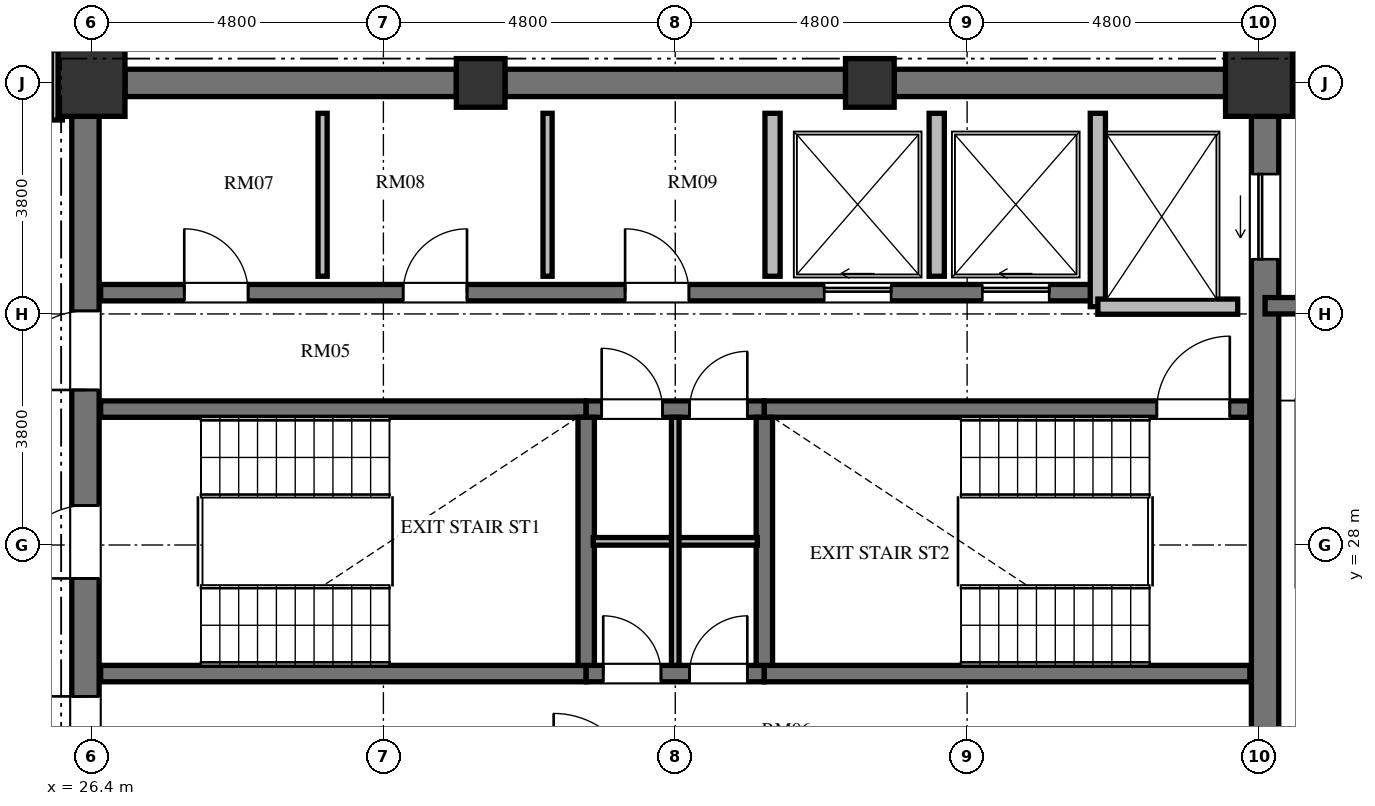
"""IFC4 building model, lengths in metres.
Left out: names, types, materials, properties, quantities, classifications, styles, units other than length and angle.
Written with IfcOpenShell. Run it as: python <this file> out.ifc"""

import sys

from ifc_helpers import new_model, si_unit, direction, frame, frame_2d, origin, origin_2d, place, context, subcontext, project, spatial, rectangle, extrude, element, fill, save


model = new_model("IFC4")
c1 = context("Model", 3, precision=1e-05, world=origin(), true_north=direction((0.0, 1.0)))
c2 = subcontext(c1, "Body", "Model", "MODEL_VIEW")
j1 = project(units=[si_unit("LENGTHUNIT", "METRE"), si_unit("PLANEANGLEUNIT", "RADIAN")], contexts=[c1])
p1 = place(None, origin())
s1 = spatial("IfcSite", under=j1, at=p1, CompositionType="ELEMENT")
p2 = place(p1, origin())
s2 = spatial("IfcBuilding", under=s1, at=p2, CompositionType="ELEMENT")
p3 = place(p2, frame((0.0, 0.0, 234.96)))
s3 = spatial("IfcBuildingStorey", under=s2, at=p3, CompositionType="ELEMENT", Elevation=234.96)
p4 = place(p3, frame((45.6, 35.6, 0.0), z_axis=(0.0, 0.0, 1.0), x_axis=(1.0, 0.0, 0.0)))
e1 = element("IfcColumn", 1, at=p4, inside=s3, PredefinedType="COLUMN", context=c2, shape_type="SweptSolid", body=[
    extrude(rectangle(XDim=1.1, YDim=1.1, at=origin_2d()), origin(), (0.0, 0.0, 1.0), 3.648),
])
for number, where, z_axis, x_axis in (
    (2, (39.2, 35.6, 0.0), (0.0, 0.0, 1.0), (1.0, 0.0, 0.0)),
    (3, (32.8, 35.6, 0.0), (0.0, 0.0, 1.0), (1.0, 0.0, 0.0)),
):
    element("IfcColumn", number, at=place(p3, frame(where, z_axis=z_axis, x_axis=x_axis)), inside=s3, PredefinedType="COLUMN", context=c2, shape_type="SweptSolid", body=[
        extrude(rectangle(XDim=0.8, YDim=0.8, at=origin_2d()), origin(), (0.0, 0.0, 1.0), 3.648),
    ])
p5 = place(p3, frame((26.4, 35.6, 0.0), z_axis=(0.0, 0.0, 1.0), x_axis=(1.0, 0.0, 0.0)))
e4 = element("IfcColumn", 4, at=p5, inside=s3, PredefinedType="COLUMN", context=c2, shape_type="SweptSolid", body=[
    extrude(rectangle(XDim=1.1, YDim=1.1, at=origin_2d()), origin(), (0.0, 0.0, 1.0), 3.648),
])
p6 = place(p3, frame((26.3, 20.95, 0.0), z_axis=(0.0, 0.0, 1.0), x_axis=(0.0, 1.0, 0.0)))
e5 = element("IfcWall", 5, at=p6, inside=s3, PredefinedType="SHEAR", context=c2, shape_type="SweptSolid", body=[
    extrude(rectangle(XDim=14.1, YDim=0.45, at=frame_2d((7.05, 0.0))), origin(), (0.0, 0.0, 1.0), 3.648),
])
p7 = place(p6, frame((6.5, 0.0, 0.0)))
e6 = element("IfcOpeningElement", 6, at=p7, cuts=e5, PredefinedType="OPENING", context=c2, shape_type="SweptSolid", body=[
    extrude(rectangle(XDim=1.2, YDim=2.15, at=frame_2d((0.6, 1.075))), frame((0.0, 0.235, 0.0), z_axis=(0.0, -1.0, 0.0), x_axis=(1.0, 0.0, 0.0)), (0.0, 0.0, 1.0), 0.47),
])
p8 = place(p6, frame((9.6, 0.0, 0.0)))
e7 = element("IfcOpeningElement", 7, at=p8, cuts=e5, PredefinedType="OPENING", context=c2, shape_type="SweptSolid", body=[
    extrude(rectangle(XDim=1.3, YDim=2.2, at=frame_2d((0.65, 1.1))), frame((0.0, 0.235, 0.0), z_axis=(0.0, -1.0, 0.0), x_axis=(1.0, 0.0, 0.0)), (0.0, 0.0, 1.0), 0.47),
])
p9 = place(p6, frame((3.26, 0.0, 0.0)))
e8 = element("IfcOpeningElement", 8, at=p9, cuts=e5, PredefinedType="OPENING", context=c2, shape_type="SweptSolid", body=[
    extrude(rectangle(XDim=1.3, YDim=2.2, at=frame_2d((0.65, 1.1))), frame((0.0, 0.235, 0.0), z_axis=(0.0, -1.0, 0.0), x_axis=(1.0, 0.0, 0.0)), (0.0, 0.0, 1.0), 0.47),
])
p10 = place(p3, frame((45.7, 20.95, 0.0), z_axis=(0.0, 0.0, 1.0), x_axis=(0.0, 1.0, 0.0)))
e9 = element("IfcWall", 9, at=p10, inside=s3, PredefinedType="SHEAR", context=c2, shape_type="SweptSolid", body=[
    extrude(rectangle(XDim=14.1, YDim=0.45, at=frame_2d((7.05, 0.0))), origin(), (0.0, 0.0, 1.0), 3.648),
])
p11 = place(p10, frame((11.75, 0.0, 0.0)))
e10 = element("IfcOpeningElement", 10, at=p11, cuts=e9, PredefinedType="OPENING", context=c2, shape_type="SweptSolid", body=[
    extrude(rectangle(XDim=1.4, YDim=2.3, at=frame_2d((0.7, 1.15))), frame((0.0, 0.235, 0.0), z_axis=(0.0, -1.0, 0.0), x_axis=(1.0, 0.0, 0.0)), (0.0, 0.0, 1.0), 0.47),
])
p12 = place(p10, frame((0.95, 0.0, 0.0)))
e11 = element("IfcOpeningElement", 11, at=p12, cuts=e9, PredefinedType="OPENING", context=c2, shape_type="SweptSolid", body=[
    extrude(rectangle(XDim=1.4, YDim=2.3, at=frame_2d((0.7, 1.15))), frame((0.0, 0.235, 0.0), z_axis=(0.0, -1.0, 0.0), x_axis=(1.0, 0.0, 0.0)), (0.0, 0.0, 1.0), 0.47),
])
p13 = place(p3, frame((26.95, 35.6, 0.0), z_axis=(0.0, 0.0, 1.0), x_axis=(1.0, 0.0, 0.0)))
e12 = element("IfcWall", 12, at=p13, inside=s3, PredefinedType="SHEAR", context=c2, shape_type="SweptSolid", body=[
    extrude(rectangle(XDim=5.45, YDim=0.45, at=frame_2d((2.725, 0.0))), origin(), (0.0, 0.0, 1.0), 3.648),
])
p14 = place(p3, frame((33.2, 35.6, 0.0), z_axis=(0.0, 0.0, 1.0), x_axis=(1.0, 0.0, 0.0)))
e13 = element("IfcWall", 13, at=p14, inside=s3, PredefinedType="SHEAR", context=c2, shape_type="SweptSolid", body=[
    extrude(rectangle(XDim=5.6, YDim=0.45, at=frame_2d((2.8, 0.0))), origin(), (0.0, 0.0, 1.0), 3.648),
])
p15 = place(p3, frame((39.6, 35.6, 0.0), z_axis=(0.0, 0.0, 1.0), x_axis=(1.0, 0.0, 0.0)))
e14 = element("IfcWall", 14, at=p15, inside=s3, PredefinedType="SHEAR", context=c2, shape_type="SweptSolid", body=[
    extrude(rectangle(XDim=5.45, YDim=0.45, at=frame_2d((2.725, 0.0))), origin(), (0.0, 0.0, 1.0), 3.648),
])
p16 = place(p3, frame((26.55, 30.235, 0.0), z_axis=(0.0, 0.0, 1.0), x_axis=(1.0, 0.0, 0.0)))
e15 = element("IfcWall", 15, at=p16, inside=s3, PredefinedType="SHEAR", context=c2, shape_type="SweptSolid", body=[
    extrude(rectangle(XDim=7.985, YDim=0.27, at=frame_2d((3.992, 0.0))), origin(), (0.0, 0.0, 1.0), 3.648),
])
p17 = place(p3, frame((34.535, 30.235, 0.0), z_axis=(0.0, 0.0, 1.0), x_axis=(1.0, 0.0, 0.0)))
e16 = element("IfcWall", 16, at=p17, inside=s3, PredefinedType="SHEAR", context=c2, shape_type="SweptSolid", body=[
    extrude(rectangle(XDim=2.93, YDim=0.27, at=frame_2d((1.465, 0.0))), origin(), (0.0, 0.0, 1.0), 3.648),
])
p18 = place(p17, frame((0.255, 0.0, 0.0)))
e17 = element("IfcOpeningElement", 17, at=p18, cuts=e16, PredefinedType="OPENING", context=c2, shape_type="SweptSolid", body=[
    extrude(rectangle(XDim=1.0, YDim=2.1, at=frame_2d((0.5, 1.05))), frame((0.0, 0.145, 0.0), z_axis=(0.0, -1.0, 0.0), x_axis=(1.0, 0.0, 0.0)), (0.0, 0.0, 1.0), 0.29),
])
p19 = place(p17, frame((1.7, 0.0, 0.0)))
e18 = element("IfcOpeningElement", 18, at=p19, cuts=e16, PredefinedType="OPENING", context=c2, shape_type="SweptSolid", body=[
    extrude(rectangle(XDim=0.95, YDim=2.1, at=frame_2d((0.475, 1.05))), frame((0.0, 0.145, 0.0), z_axis=(0.0, -1.0, 0.0), x_axis=(1.0, 0.0, 0.0)), (0.0, 0.0, 1.0), 0.29),
])
p20 = place(p3, frame((37.465, 30.235, 0.0), z_axis=(0.0, 0.0, 1.0), x_axis=(1.0, 0.0, 0.0)))
e19 = element("IfcWall", 19, at=p20, inside=s3, PredefinedType="SHEAR", context=c2, shape_type="SweptSolid", body=[
    extrude(rectangle(XDim=7.985, YDim=0.27, at=frame_2d((3.992, 0.0))), origin(), (0.0, 0.0, 1.0), 3.648),
])
p21 = place(p20, frame((6.455, 0.0, 0.0)))
e20 = element("IfcOpeningElement", 20, at=p21, cuts=e19, PredefinedType="OPENING", context=c2, shape_type="SweptSolid", body=[
    extrude(rectangle(XDim=1.2, YDim=2.15, at=frame_2d((0.6, 1.075))), frame((0.0, 0.145, 0.0), z_axis=(0.0, -1.0, 0.0), x_axis=(1.0, 0.0, 0.0)), (0.0, 0.0, 1.0), 0.29),
])
p22 = place(p3, frame((26.55, 25.885, 0.0), z_axis=(0.0, 0.0, 1.0), x_axis=(1.0, 0.0, 0.0)))
e21 = element("IfcWall", 21, at=p22, inside=s3, PredefinedType="SHEAR", context=c2, shape_type="SweptSolid", body=[
    extrude(rectangle(XDim=7.985, YDim=0.27, at=frame_2d((3.992, 0.0))), origin(), (0.0, 0.0, 1.0), 3.648),
])
p23 = place(p3, frame((34.535, 25.885, 0.0), z_axis=(0.0, 0.0, 1.0), x_axis=(1.0, 0.0, 0.0)))
e22 = element("IfcWall", 22, at=p23, inside=s3, PredefinedType="SHEAR", context=c2, shape_type="SweptSolid", body=[
    extrude(rectangle(XDim=2.93, YDim=0.27, at=frame_2d((1.465, 0.0))), origin(), (0.0, 0.0, 1.0), 3.648),
])
p24 = place(p23, frame((0.28, 0.0, 0.0)))
e23 = element("IfcOpeningElement", 23, at=p24, cuts=e22, PredefinedType="OPENING", context=c2, shape_type="SweptSolid", body=[
    extrude(rectangle(XDim=0.95, YDim=2.1, at=frame_2d((0.475, 1.05))), frame((0.0, 0.145, 0.0), z_axis=(0.0, -1.0, 0.0), x_axis=(1.0, 0.0, 0.0)), (0.0, 0.0, 1.0), 0.29),
])
p25 = place(p23, frame((1.7, 0.0, 0.0)))
e24 = element("IfcOpeningElement", 24, at=p25, cuts=e22, PredefinedType="OPENING", context=c2, shape_type="SweptSolid", body=[
    extrude(rectangle(XDim=0.95, YDim=2.1, at=frame_2d((0.475, 1.05))), frame((0.0, 0.145, 0.0), z_axis=(0.0, -1.0, 0.0), x_axis=(1.0, 0.0, 0.0)), (0.0, 0.0, 1.0), 0.29),
])
p26 = place(p3, frame((37.465, 25.885, 0.0), z_axis=(0.0, 0.0, 1.0), x_axis=(1.0, 0.0, 0.0)))
e25 = element("IfcWall", 25, at=p26, inside=s3, PredefinedType="SHEAR", context=c2, shape_type="SweptSolid", body=[
    extrude(rectangle(XDim=7.985, YDim=0.27, at=frame_2d((3.992, 0.0))), origin(), (0.0, 0.0, 1.0), 3.648),
])
for number, where, z_axis, x_axis in (
    (26, (34.535, 26.02, 0.0), (0.0, 0.0, 1.0), (0.0, 1.0, 0.0)),
    (27, (37.465, 26.02, 0.0), (0.0, 0.0, 1.0), (0.0, 1.0, 0.0)),
):
    element("IfcWall", number, at=place(p3, frame(where, z_axis=z_axis, x_axis=x_axis)), inside=s3, PredefinedType="SHEAR", context=c2, shape_type="SweptSolid", body=[
        extrude(rectangle(XDim=4.08, YDim=0.27, at=frame_2d((2.04, 0.0))), origin(), (0.0, 0.0, 1.0), 3.648),
    ])
p27 = place(p3, frame((34.65, 28.06, 0.0), z_axis=(0.0, 0.0, 1.0), x_axis=(1.0, 0.0, 0.0)))
e28 = element("IfcWall", 28, at=p27, inside=s3, PredefinedType="PARTITIONING", context=c2, shape_type="SweptSolid", body=[
    extrude(rectangle(XDim=2.7, YDim=0.125, at=frame_2d((1.35, 0.0))), origin(), (0.0, 0.0, 1.0), 3.448),
])
p28 = place(p3, frame((36.0, 26.02, 0.0), z_axis=(0.0, 0.0, 1.0), x_axis=(0.0, 1.0, 0.0)))
e29 = element("IfcWall", 29, at=p28, inside=s3, PredefinedType="PARTITIONING", context=c2, shape_type="SweptSolid", body=[
    extrude(rectangle(XDim=4.08, YDim=0.125, at=frame_2d((2.04, 0.0))), origin(), (0.0, 0.0, 1.0), 3.448),
])
p29 = place(p3, frame((26.55, 32.15, 0.0), z_axis=(0.0, 0.0, 1.0), x_axis=(1.0, 0.0, 0.0)))
e30 = element("IfcWall", 30, at=p29, inside=s3, PredefinedType="SHEAR", context=c2, shape_type="SweptSolid", body=[
    extrude(rectangle(XDim=16.4, YDim=0.27, at=frame_2d((8.2, 0.0))), origin(), (0.0, 0.0, 1.0), 3.648),
])
p30 = place(p29, frame((1.375, 0.0, 0.0)))
e31 = element("IfcOpeningElement", 31, at=p30, cuts=e30, PredefinedType="OPENING", context=c2, shape_type="SweptSolid", body=[
    extrude(rectangle(XDim=1.05, YDim=2.15, at=frame_2d((0.525, 1.075))), frame((0.0, 0.145, 0.0), z_axis=(0.0, -1.0, 0.0), x_axis=(1.0, 0.0, 0.0)), (0.0, 0.0, 1.0), 0.29),
])
p31 = place(p29, frame((4.975, 0.0, 0.0)))
e32 = element("IfcOpeningElement", 32, at=p31, cuts=e30, PredefinedType="OPENING", context=c2, shape_type="SweptSolid", body=[
    extrude(rectangle(XDim=1.05, YDim=2.15, at=frame_2d((0.525, 1.075))), frame((0.0, 0.145, 0.0), z_axis=(0.0, -1.0, 0.0), x_axis=(1.0, 0.0, 0.0)), (0.0, 0.0, 1.0), 0.29),
])
p32 = place(p29, frame((8.625, 0.0, 0.0)))
e33 = element("IfcOpeningElement", 33, at=p32, cuts=e30, PredefinedType="OPENING", context=c2, shape_type="SweptSolid", body=[
    extrude(rectangle(XDim=1.05, YDim=2.15, at=frame_2d((0.525, 1.075))), frame((0.0, 0.145, 0.0), z_axis=(0.0, -1.0, 0.0), x_axis=(1.0, 0.0, 0.0)), (0.0, 0.0, 1.0), 0.29),
])
p33 = place(p29, frame((11.9, 0.0, 0.0)))
e34 = element("IfcOpeningElement", 34, at=p33, cuts=e30, PredefinedType="OPENING", context=c2, shape_type="SweptSolid", body=[
    extrude(rectangle(XDim=1.1, YDim=2.2, at=frame_2d((0.55, 1.1))), frame((0.0, 0.145, 0.0), z_axis=(0.0, -1.0, 0.0), x_axis=(1.0, 0.0, 0.0)), (0.0, 0.0, 1.0), 0.29),
])
p34 = place(p29, frame((14.5, 0.0, 0.0)))
e35 = element("IfcOpeningElement", 35, at=p34, cuts=e30, PredefinedType="OPENING", context=c2, shape_type="SweptSolid", body=[
    extrude(rectangle(XDim=1.1, YDim=2.2, at=frame_2d((0.55, 1.1))), frame((0.0, 0.145, 0.0), z_axis=(0.0, -1.0, 0.0), x_axis=(1.0, 0.0, 0.0)), (0.0, 0.0, 1.0), 0.29),
])
p35 = place(p3, frame((42.95, 31.92, 0.0), z_axis=(0.0, 0.0, 1.0), x_axis=(0.0, 1.0, 0.0)))
e36 = element("IfcWall", 36, at=p35, inside=s3, PredefinedType="SOLIDWALL", context=c2, shape_type="SweptSolid", body=[
    extrude(rectangle(XDim=3.18, YDim=0.25, at=frame_2d((1.59, 0.0))), origin(), (0.0, 0.0, 1.0), 3.448),
])
p36 = place(p3, frame((42.95, 31.92, 0.0), z_axis=(0.0, 0.0, 1.0), x_axis=(1.0, 0.0, 0.0)))
e37 = element("IfcWall", 37, at=p36, inside=s3, PredefinedType="SOLIDWALL", context=c2, shape_type="SweptSolid", body=[
    extrude(rectangle(XDim=2.3, YDim=0.25, at=frame_2d((1.15, 0.0))), origin(), (0.0, 0.0, 1.0), 3.448),
])
for number, where, z_axis, x_axis in (
    (38, (37.6, 32.42, 0.0), (0.0, 0.0, 1.0), (0.0, 1.0, 0.0)),
    (39, (40.3, 32.42, 0.0), (0.0, 0.0, 1.0), (0.0, 1.0, 0.0)),
):
    element("IfcWall", number, at=place(p3, frame(where, z_axis=z_axis, x_axis=x_axis)), inside=s3, PredefinedType="SOLIDWALL", context=c2, shape_type="SweptSolid", body=[
        extrude(rectangle(XDim=2.68, YDim=0.25, at=frame_2d((1.34, 0.0))), origin(), (0.0, 0.0, 1.0), 3.448),
    ])
for number, where, z_axis, x_axis in (
    (40, (30.2, 32.42, 0.0), (0.0, 0.0, 1.0), (0.0, 1.0, 0.0)),
    (41, (33.9, 32.42, 0.0), (0.0, 0.0, 1.0), (0.0, 1.0, 0.0)),
):
    element("IfcWall", number, at=place(p3, frame(where, z_axis=z_axis, x_axis=x_axis)), inside=s3, PredefinedType="PARTITIONING", context=c2, shape_type="SweptSolid", body=[
        extrude(rectangle(XDim=2.68, YDim=0.15, at=frame_2d((1.34, 0.0))), origin(), (0.0, 0.0, 1.0), 3.448),
    ])
p37 = place(p3, frame((45.925, 35.98, 0.0), z_axis=(0.0, 0.0, 1.0), x_axis=(1.0, 0.0, 0.0)))
e42 = element("IfcWall", 42, at=p37, inside=s3, PredefinedType="SHEAR", context=c2, shape_type="SweptSolid", body=[
    extrude(rectangle(XDim=4.625, YDim=0.27, at=frame_2d((2.312, 0.0))), origin(), (0.0, 0.0, 1.0), 3.648),
])
p38 = place(p3, frame((45.7, 31.935, 0.0), z_axis=(0.0, 0.0, 1.0), x_axis=(1.0, 0.0, 0.0)))
e43 = element("IfcWall", 43, at=p38, inside=s3, PredefinedType="SHEAR", context=c2, shape_type="SweptSolid", body=[
    extrude(rectangle(XDim=4.715, YDim=0.27, at=frame_2d((2.357, 0.0))), origin(), (0.0, 0.0, 1.0), 3.648),
])
p39 = place(p3, frame((25.83, 36.14, 0.0), z_axis=(0.0, 0.0, 1.0), x_axis=(0.0, -1.0, 0.0)))
e44 = element("IfcWall", 44, at=p39, inside=s3, PredefinedType="PARTITIONING", context=c2, shape_type="SweptSolid", body=[
    extrude(rectangle(XDim=1.15, YDim=0.18, at=frame_2d((0.575, 0.0))), origin(), (0.0, 0.0, 1.0), 3.448),
])
p40 = place(p7, origin())
e45 = element("IfcDoor", 45, at=p40, inside=s3, OperationType="SINGLE_SWING_LEFT", PredefinedType="DOOR", context=c2, shape_type="SweptSolid", body=[
    extrude(rectangle(XDim=1.2, YDim=2.15, at=frame_2d((0.6, 1.075))), frame((0.0, 0.025, 0.0), z_axis=(0.0, -1.0, 0.0), x_axis=(1.0, 0.0, 0.0)), (0.0, 0.0, 1.0), 0.05),
])
fill(e6, e45)
p41 = place(p21, origin())
e46 = element("IfcDoor", 46, at=p41, inside=s3, OperationType="SINGLE_SWING_RIGHT", PredefinedType="DOOR", context=c2, shape_type="SweptSolid", body=[
    extrude(rectangle(XDim=1.2, YDim=2.15, at=frame_2d((0.6, 1.075))), frame((0.0, 0.025, 0.0), z_axis=(0.0, -1.0, 0.0), x_axis=(1.0, 0.0, 0.0)), (0.0, 0.0, 1.0), 0.05),
])
fill(e20, e46)
p42 = place(p24, origin())
e47 = element("IfcDoor", 47, at=p42, inside=s3, OperationType="SINGLE_SWING_LEFT", PredefinedType="DOOR", context=c2, shape_type="SweptSolid", body=[
    extrude(rectangle(XDim=0.95, YDim=2.1, at=frame_2d((0.475, 1.05))), frame((0.0, 0.025, 0.0), z_axis=(0.0, -1.0, 0.0), x_axis=(1.0, 0.0, 0.0)), (0.0, 0.0, 1.0), 0.05),
])
fill(e23, e47)
p43 = place(p25, origin())
e48 = element("IfcDoor", 48, at=p43, inside=s3, OperationType="SINGLE_SWING_RIGHT", PredefinedType="DOOR", context=c2, shape_type="SweptSolid", body=[
    extrude(rectangle(XDim=0.95, YDim=2.1, at=frame_2d((0.475, 1.05))), frame((0.0, 0.025, 0.0), z_axis=(0.0, -1.0, 0.0), x_axis=(1.0, 0.0, 0.0)), (0.0, 0.0, 1.0), 0.05),
])
fill(e24, e48)
p44 = place(p18, origin())
e49 = element("IfcDoor", 49, at=p44, inside=s3, OperationType="SINGLE_SWING_LEFT", PredefinedType="DOOR", context=c2, shape_type="SweptSolid", body=[
    extrude(rectangle(XDim=1.0, YDim=2.1, at=frame_2d((0.5, 1.05))), frame((0.0, 0.025, 0.0), z_axis=(0.0, -1.0, 0.0), x_axis=(1.0, 0.0, 0.0)), (0.0, 0.0, 1.0), 0.05),
])
fill(e17, e49)
p45 = place(p19, origin())
e50 = element("IfcDoor", 50, at=p45, inside=s3, OperationType="SINGLE_SWING_RIGHT", PredefinedType="DOOR", context=c2, shape_type="SweptSolid", body=[
    extrude(rectangle(XDim=0.95, YDim=2.1, at=frame_2d((0.475, 1.05))), frame((0.0, 0.025, 0.0), z_axis=(0.0, -1.0, 0.0), x_axis=(1.0, 0.0, 0.0)), (0.0, 0.0, 1.0), 0.05),
])
fill(e18, e50)
p46 = place(p8, origin())
e51 = element("IfcDoor", 51, at=p46, inside=s3, OperationType="SINGLE_SWING_LEFT", PredefinedType="DOOR", context=c2, shape_type="SweptSolid", body=[
    extrude(rectangle(XDim=1.3, YDim=2.2, at=frame_2d((0.65, 1.1))), frame((0.0, 0.025, 0.0), z_axis=(0.0, -1.0, 0.0), x_axis=(1.0, 0.0, 0.0)), (0.0, 0.0, 1.0), 0.05),
])
fill(e7, e51)
p47 = place(p9, origin())
e52 = element("IfcDoor", 52, at=p47, inside=s3, OperationType="SINGLE_SWING_RIGHT", PredefinedType="DOOR", context=c2, shape_type="SweptSolid", body=[
    extrude(rectangle(XDim=1.3, YDim=2.2, at=frame_2d((0.65, 1.1))), frame((0.0, 0.025, 0.0), z_axis=(0.0, -1.0, 0.0), x_axis=(1.0, 0.0, 0.0)), (0.0, 0.0, 1.0), 0.05),
])
fill(e8, e52)
p48 = place(p30, origin())
e53 = element("IfcDoor", 53, at=p48, inside=s3, OperationType="SINGLE_SWING_LEFT", PredefinedType="DOOR", context=c2, shape_type="SweptSolid", body=[
    extrude(rectangle(XDim=1.05, YDim=2.15, at=frame_2d((0.525, 1.075))), frame((0.0, 0.025, 0.0), z_axis=(0.0, -1.0, 0.0), x_axis=(1.0, 0.0, 0.0)), (0.0, 0.0, 1.0), 0.05),
])
fill(e31, e53)
p49 = place(p31, origin())
e54 = element("IfcDoor", 54, at=p49, inside=s3, OperationType="SINGLE_SWING_RIGHT", PredefinedType="DOOR", context=c2, shape_type="SweptSolid", body=[
    extrude(rectangle(XDim=1.05, YDim=2.15, at=frame_2d((0.525, 1.075))), frame((0.0, 0.025, 0.0), z_axis=(0.0, -1.0, 0.0), x_axis=(1.0, 0.0, 0.0)), (0.0, 0.0, 1.0), 0.05),
])
fill(e32, e54)
p50 = place(p32, origin())
e55 = element("IfcDoor", 55, at=p50, inside=s3, OperationType="SINGLE_SWING_LEFT", PredefinedType="DOOR", context=c2, shape_type="SweptSolid", body=[
    extrude(rectangle(XDim=1.05, YDim=2.15, at=frame_2d((0.525, 1.075))), frame((0.0, 0.025, 0.0), z_axis=(0.0, -1.0, 0.0), x_axis=(1.0, 0.0, 0.0)), (0.0, 0.0, 1.0), 0.05),
])
fill(e33, e55)
p51 = place(p33, origin())
e56 = element("IfcDoor", 56, at=p51, inside=s3, OperationType="SLIDING_TO_LEFT", PredefinedType="DOOR", context=c2, shape_type="SweptSolid", body=[
    extrude(rectangle(XDim=1.1, YDim=2.2, at=frame_2d((0.55, 1.1))), frame((0.0, 0.025, 0.0), z_axis=(0.0, -1.0, 0.0), x_axis=(1.0, 0.0, 0.0)), (0.0, 0.0, 1.0), 0.05),
])
fill(e34, e56)
p52 = place(p34, origin())
e57 = element("IfcDoor", 57, at=p52, inside=s3, OperationType="SLIDING_TO_LEFT", PredefinedType="DOOR", context=c2, shape_type="SweptSolid", body=[
    extrude(rectangle(XDim=1.1, YDim=2.2, at=frame_2d((0.55, 1.1))), frame((0.0, 0.025, 0.0), z_axis=(0.0, -1.0, 0.0), x_axis=(1.0, 0.0, 0.0)), (0.0, 0.0, 1.0), 0.05),
])
fill(e35, e57)
p53 = place(p11, origin())
e58 = element("IfcDoor", 58, at=p53, inside=s3, OperationType="SLIDING_TO_LEFT", PredefinedType="DOOR", context=c2, shape_type="SweptSolid", body=[
    extrude(rectangle(XDim=1.4, YDim=2.3, at=frame_2d((0.7, 1.15))), frame((0.0, 0.025, 0.0), z_axis=(0.0, -1.0, 0.0), x_axis=(1.0, 0.0, 0.0)), (0.0, 0.0, 1.0), 0.05),
])
fill(e10, e58)
save(model, sys.argv[1])
